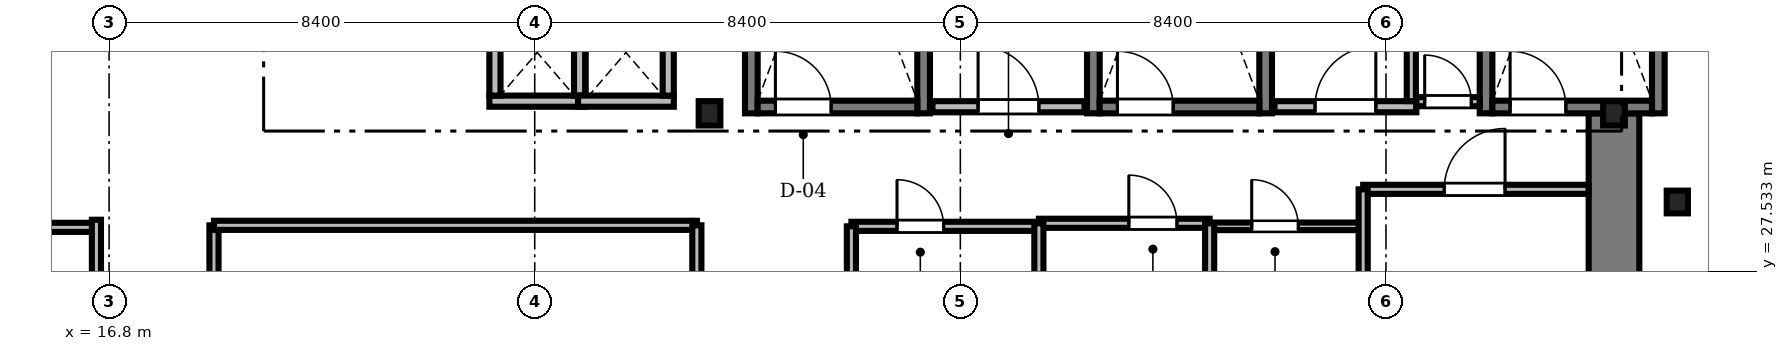
"""IFC4 building model, lengths in metres.
Left out: names, types, materials, properties, quantities, classifications, styles, units other than length and angle.
Written with IfcOpenShell. Run it as: python <this file> out.ifc"""

import sys

from ifc_helpers import new_model, si_unit, direction, frame, frame_2d, origin, origin_2d, place, context, subcontext, project, spatial, rectangle, i_section, extrude, source, transform, mapped, element, fill, save


model = new_model("IFC4")
c1 = context("Model", 3, precision=1e-05, world=origin(), true_north=direction((0.0, 1.0)))
c2 = subcontext(c1, "Body", "Model", "MODEL_VIEW")
j1 = project(units=[si_unit("LENGTHUNIT", "METRE"), si_unit("PLANEANGLEUNIT", "RADIAN")], contexts=[c1])
p1 = place(None, origin())
s1 = spatial("IfcSite", under=j1, at=p1, CompositionType="ELEMENT")
p2 = place(p1, origin())
s2 = spatial("IfcBuilding", under=s1, at=p2, CompositionType="ELEMENT")
p3 = place(p2, frame((0.0, 0.0, 78.7)))
s3 = spatial("IfcBuildingStorey", under=s2, at=p3, CompositionType="ELEMENT", Elevation=78.7)
m1 = source(origin(), c2, "Body", "SweptSolid", [
    extrude(rectangle(XDim=13.15, YDim=1.0, at=frame_2d((6.575, 0.0))), origin(), (0.0, 0.0, 1.0), 3.41),
])
p4 = place(p3, frame((46.5, 17.5, 0.0), z_axis=(0.0, 0.0, 1.0), x_axis=(0.0, 1.0, 0.0)))
e1 = element("IfcWall", 1, at=p4, inside=s3, PredefinedType="SHEAR", context=c2, shape_type="MappedRepresentation", body=[
    mapped(m1, transform((0.0, 0.0, 0.0), scale=1.0)),
])
m2 = source(origin(), c2, "Body", "SweptSolid", [
    extrude(i_section(OverallWidth=0.428, OverallDepth=0.481, WebThickness=0.04, FlangeThickness=0.063, FilletRadius=0.015, at=origin_2d()), origin(), (0.0, 0.0, 1.0), 3.41),
])
for number, where, z_axis, x_axis in (
    (2, (28.65, 30.65, 0.0), (0.0, 0.0, 1.0), (1.0, 0.0, 0.0)),
    (3, (46.5, 30.65, 0.0), (0.0, 0.0, 1.0), (1.0, 0.0, 0.0)),
):
    element("IfcColumn", number, at=place(p3, frame(where, z_axis=z_axis, x_axis=x_axis)), inside=s3, PredefinedType="COLUMN", context=c2, shape_type="MappedRepresentation", body=[
        mapped(m2, transform((0.0, 0.0, 0.0), scale=1.0)),
    ])
m3 = source(origin(), c2, "Body", "SweptSolid", [
    extrude(i_section(OverallWidth=0.419, OverallDepth=0.449, WebThickness=0.031, FlangeThickness=0.048, FilletRadius=0.015, at=origin_2d()), origin(), (0.0, 0.0, 1.0), 3.41),
])
p5 = place(p3, frame((47.75, 28.9, 0.0), z_axis=(0.0, 0.0, 1.0), x_axis=(1.0, 0.0, 0.0)))
e4 = element("IfcColumn", 4, at=p5, inside=s3, PredefinedType="COLUMN", context=c2, shape_type="MappedRepresentation", body=[
    mapped(m3, transform((0.0, 0.0, 0.0), scale=1.0)),
])
m4 = source(origin(), c2, "Body", "SweptSolid", [
    extrude(rectangle(XDim=9.15, YDim=0.25, at=frame_2d((4.575, 0.0))), origin(), (0.0, 0.0, 1.0), 3.45),
])
for number, where, z_axis, x_axis in (
    (5, (29.475, 30.65, 0.0), (0.0, 0.0, 1.0), (0.0, 1.0, 0.0)),
    (6, (32.875, 30.65, 0.0), (0.0, 0.0, 1.0), (0.0, 1.0, 0.0)),
):
    element("IfcWall", number, at=place(p3, frame(where, z_axis=z_axis, x_axis=x_axis)), inside=s3, PredefinedType="SOLIDWALL", context=c2, shape_type="MappedRepresentation", body=[
        mapped(m4, transform((0.0, 0.0, 0.0), scale=1.0)),
    ])
m5 = source(origin(), c2, "Body", "SweptSolid", [
    extrude(rectangle(XDim=3.15, YDim=0.25, at=frame_2d((1.575, 0.0))), origin(), (0.0, 0.0, 1.0), 3.45),
])
p6 = place(p3, frame((29.6, 30.775, 0.0), z_axis=(0.0, 0.0, 1.0), x_axis=(1.0, 0.0, 0.0)))
e7 = element("IfcWall", 7, at=p6, inside=s3, PredefinedType="SOLIDWALL", context=c2, shape_type="MappedRepresentation", body=[
    mapped(m5, transform((0.0, 0.0, 0.0), scale=1.0)),
])
m6 = source(origin(), c2, "Body", "SweptSolid", [
    extrude(rectangle(XDim=1.1, YDim=2.2, at=frame_2d((0.55, 1.1))), frame((0.0, 0.135, 0.0), z_axis=(0.0, -1.0, 0.0), x_axis=(1.0, 0.0, 0.0)), (0.0, 0.0, 1.0), 0.27),
])
p7 = place(p6, frame((0.35, 0.0, 0.0)))
e8 = element("IfcOpeningElement", 8, at=p7, cuts=e7, PredefinedType="OPENING", context=c2, shape_type="MappedRepresentation", body=[
    mapped(m6, transform((0.0, 0.0, 0.0), scale=1.0)),
])
for number, where, z_axis, x_axis in (
    (9, (36.225, 30.65, 0.0), (0.0, 0.0, 1.0), (0.0, 1.0, 0.0)),
    (10, (39.625, 30.65, 0.0), (0.0, 0.0, 1.0), (0.0, 1.0, 0.0)),
):
    element("IfcWall", number, at=place(p3, frame(where, z_axis=z_axis, x_axis=x_axis)), inside=s3, PredefinedType="SOLIDWALL", context=c2, shape_type="MappedRepresentation", body=[
        mapped(m4, transform((0.0, 0.0, 0.0), scale=1.0)),
    ])
p8 = place(p3, frame((36.35, 30.775, 0.0), z_axis=(0.0, 0.0, 1.0), x_axis=(1.0, 0.0, 0.0)))
e11 = element("IfcWall", 11, at=p8, inside=s3, PredefinedType="SOLIDWALL", context=c2, shape_type="MappedRepresentation", body=[
    mapped(m5, transform((0.0, 0.0, 0.0), scale=1.0)),
])
p9 = place(p8, frame((0.35, 0.0, 0.0)))
e12 = element("IfcOpeningElement", 12, at=p9, cuts=e11, PredefinedType="OPENING", context=c2, shape_type="MappedRepresentation", body=[
    mapped(m6, transform((0.0, 0.0, 0.0), scale=1.0)),
])
for number, where, z_axis, x_axis in (
    (13, (43.975, 30.65, 0.0), (0.0, 0.0, 1.0), (0.0, 1.0, 0.0)),
    (14, (47.375, 30.65, 0.0), (0.0, 0.0, 1.0), (0.0, 1.0, 0.0)),
):
    element("IfcWall", number, at=place(p3, frame(where, z_axis=z_axis, x_axis=x_axis)), inside=s3, PredefinedType="SOLIDWALL", context=c2, shape_type="MappedRepresentation", body=[
        mapped(m4, transform((0.0, 0.0, 0.0), scale=1.0)),
    ])
p10 = place(p3, frame((44.1, 30.775, 0.0), z_axis=(0.0, 0.0, 1.0), x_axis=(1.0, 0.0, 0.0)))
e15 = element("IfcWall", 15, at=p10, inside=s3, PredefinedType="SOLIDWALL", context=c2, shape_type="MappedRepresentation", body=[
    mapped(m5, transform((0.0, 0.0, 0.0), scale=1.0)),
])
p11 = place(p10, frame((0.35, 0.0, 0.0)))
e16 = element("IfcOpeningElement", 16, at=p11, cuts=e15, PredefinedType="OPENING", context=c2, shape_type="MappedRepresentation", body=[
    mapped(m6, transform((0.0, 0.0, 0.0), scale=1.0)),
])
m7 = source(origin(), c2, "Body", "SweptSolid", [
    extrude(rectangle(XDim=3.0, YDim=0.22, at=frame_2d((1.5, 0.0))), origin(), (0.0, 0.0, 1.0), 3.41),
])
p12 = place(p3, frame((33.05, 30.78, 0.0), z_axis=(0.0, 0.0, 1.0), x_axis=(1.0, 0.0, 0.0)))
e17 = element("IfcWall", 17, at=p12, inside=s3, PredefinedType="SOLIDWALL", context=c2, shape_type="MappedRepresentation", body=[
    mapped(m7, transform((0.0, 0.0, 0.0), scale=1.0)),
])
m8 = source(origin(), c2, "Body", "SweptSolid", [
    extrude(rectangle(XDim=1.2, YDim=2.2, at=frame_2d((0.6, 1.1))), frame((0.0, 0.12, 0.0), z_axis=(0.0, -1.0, 0.0), x_axis=(1.0, 0.0, 0.0)), (0.0, 0.0, 1.0), 0.24),
])
p13 = place(p12, frame((0.9, 0.0, 0.0)))
e18 = element("IfcOpeningElement", 18, at=p13, cuts=e17, PredefinedType="OPENING", context=c2, shape_type="MappedRepresentation", body=[
    mapped(m8, transform((0.0, 0.0, 0.0), scale=1.0)),
])
m9 = source(origin(), c2, "Body", "SweptSolid", [
    extrude(rectangle(XDim=2.8, YDim=0.22, at=frame_2d((1.4, 0.0))), origin(), (0.0, 0.0, 1.0), 3.41),
])
p14 = place(p3, frame((39.8, 30.78, 0.0), z_axis=(0.0, 0.0, 1.0), x_axis=(1.0, 0.0, 0.0)))
e19 = element("IfcWall", 19, at=p14, inside=s3, PredefinedType="SOLIDWALL", context=c2, shape_type="MappedRepresentation", body=[
    mapped(m9, transform((0.0, 0.0, 0.0), scale=1.0)),
])
p15 = place(p14, frame((0.8, 0.0, 0.0)))
e20 = element("IfcOpeningElement", 20, at=p15, cuts=e19, PredefinedType="OPENING", context=c2, shape_type="MappedRepresentation", body=[
    mapped(m8, transform((0.0, 0.0, 0.0), scale=1.0)),
])
m10 = source(origin(), c2, "Body", "SweptSolid", [
    extrude(rectangle(XDim=1.89, YDim=0.22, at=frame_2d((0.945, 0.0))), origin(), (0.0, 0.0, 1.0), 3.41),
])
p16 = place(p3, frame((24.305, 30.89, 0.0), z_axis=(0.0, 0.0, 1.0), x_axis=(1.0, 0.0, 0.0)))
e21 = element("IfcWall", 21, at=p16, inside=s3, PredefinedType="SOLIDWALL", context=c2, shape_type="MappedRepresentation", body=[
    mapped(m10, transform((0.0, 0.0, 0.0), scale=1.0)),
])
m11 = source(origin(), c2, "Body", "SweptSolid", [
    extrude(rectangle(XDim=1.7, YDim=0.22, at=frame_2d((0.85, 0.0))), origin(), (0.0, 0.0, 1.0), 3.41),
])
for number, where, z_axis, x_axis in (
    (22, (24.415, 31.0, 0.0), (0.0, 0.0, 1.0), (0.0, 1.0, 0.0)),
    (23, (26.085, 31.0, 0.0), (0.0, 0.0, 1.0), (0.0, 1.0, 0.0)),
):
    element("IfcWall", number, at=place(p3, frame(where, z_axis=z_axis, x_axis=x_axis)), inside=s3, PredefinedType="SOLIDWALL", context=c2, shape_type="MappedRepresentation", body=[
        mapped(m11, transform((0.0, 0.0, 0.0), scale=1.0)),
    ])
p17 = place(p3, frame((26.055, 30.89, 0.0), z_axis=(0.0, 0.0, 1.0), x_axis=(1.0, 0.0, 0.0)))
e24 = element("IfcWall", 24, at=p17, inside=s3, PredefinedType="SOLIDWALL", context=c2, shape_type="MappedRepresentation", body=[
    mapped(m10, transform((0.0, 0.0, 0.0), scale=1.0)),
])
p18 = place(p3, frame((27.835, 31.0, 0.0), z_axis=(0.0, 0.0, 1.0), x_axis=(0.0, 1.0, 0.0)))
e25 = element("IfcWall", 25, at=p18, inside=s3, PredefinedType="SOLIDWALL", context=c2, shape_type="MappedRepresentation", body=[
    mapped(m11, transform((0.0, 0.0, 0.0), scale=1.0)),
])
m12 = source(origin(), c2, "Body", "SweptSolid", [
    extrude(rectangle(XDim=4.448, YDim=0.18, at=frame_2d((2.224, 0.0))), origin(), (0.0, 0.0, 1.0), 3.042),
])
p19 = place(p3, frame((41.55, 29.15, 0.0), z_axis=(0.0, 0.0, 1.0), x_axis=(1.0, 0.0, 0.0)))
e26 = element("IfcWall", 26, at=p19, inside=s3, PredefinedType="PARTITIONING", context=c2, shape_type="MappedRepresentation", body=[
    mapped(m12, transform((0.0, 0.0, 0.0), scale=1.0)),
])
m13 = source(origin(), c2, "Body", "SweptSolid", [
    extrude(rectangle(XDim=1.2, YDim=2.2, at=frame_2d((0.6, 1.1))), frame((0.0, 0.1, 0.0), z_axis=(0.0, -1.0, 0.0), x_axis=(1.0, 0.0, 0.0)), (0.0, 0.0, 1.0), 0.2),
])
p20 = place(p19, frame((1.6, 0.0, 0.0)))
e27 = element("IfcOpeningElement", 27, at=p20, cuts=e26, PredefinedType="OPENING", context=c2, shape_type="MappedRepresentation", body=[
    mapped(m13, transform((0.0, 0.0, 0.0), scale=1.0)),
])
m14 = source(origin(), c2, "Body", "SweptSolid", [
    extrude(rectangle(XDim=4.24, YDim=0.18, at=frame_2d((2.12, 0.0))), origin(), (0.0, 0.0, 1.0), 2.802),
])
p21 = place(p3, frame((18.87, 24.2, 0.0), z_axis=(0.0, 0.0, 1.0), x_axis=(0.0, 1.0, 0.0)))
e28 = element("IfcWall", 28, at=p21, inside=s3, PredefinedType="PARTITIONING", context=c2, shape_type="MappedRepresentation", body=[
    mapped(m14, transform((0.0, 0.0, 0.0), scale=1.0)),
])
m15 = source(origin(), c2, "Body", "SweptSolid", [
    extrude(rectangle(XDim=1.05, YDim=2.2, at=frame_2d((0.525, 1.1))), frame((0.0, 0.1, 0.0), z_axis=(0.0, -1.0, 0.0), x_axis=(1.0, 0.0, 0.0)), (0.0, 0.0, 1.0), 0.2),
])
p22 = place(p21, frame((1.4, 0.0, 0.0)))
e29 = element("IfcOpeningElement", 29, at=p22, cuts=e28, PredefinedType="OPENING", context=c2, shape_type="MappedRepresentation", body=[
    mapped(m15, transform((0.0, 0.0, 0.0), scale=1.0)),
])
m16 = source(origin(), c2, "Body", "SweptSolid", [
    extrude(rectangle(XDim=3.7, YDim=0.18, at=frame_2d((1.85, 0.0))), origin(), (0.0, 0.0, 1.0), 3.042),
])
p23 = place(p3, frame((31.45, 28.42, 0.0), z_axis=(0.0, 0.0, 1.0), x_axis=(1.0, 0.0, 0.0)))
e30 = element("IfcWall", 30, at=p23, inside=s3, PredefinedType="PARTITIONING", context=c2, shape_type="MappedRepresentation", body=[
    mapped(m16, transform((0.0, 0.0, 0.0), scale=1.0)),
])
m17 = source(origin(), c2, "Body", "SweptSolid", [
    extrude(rectangle(XDim=0.92, YDim=2.1, at=frame_2d((0.46, 1.05))), frame((0.0, 0.1, 0.0), z_axis=(0.0, -1.0, 0.0), x_axis=(1.0, 0.0, 0.0)), (0.0, 0.0, 1.0), 0.2),
])
p24 = place(p23, frame((0.9, 0.0, 0.0)))
e31 = element("IfcOpeningElement", 31, at=p24, cuts=e30, PredefinedType="OPENING", context=c2, shape_type="MappedRepresentation", body=[
    mapped(m17, transform((0.0, 0.0, 0.0), scale=1.0)),
])
m18 = source(origin(), c2, "Body", "SweptSolid", [
    extrude(rectangle(XDim=3.37, YDim=0.18, at=frame_2d((1.685, 0.0))), origin(), (0.0, 0.0, 1.0), 3.41),
])
p25 = place(p3, frame((35.15, 28.48, 0.0), z_axis=(0.0, 0.0, 1.0), x_axis=(1.0, 0.0, 0.0)))
e32 = element("IfcWall", 32, at=p25, inside=s3, PredefinedType="PARTITIONING", context=c2, shape_type="MappedRepresentation", body=[
    mapped(m18, transform((0.0, 0.0, 0.0), scale=1.0)),
])
m19 = source(origin(), c2, "Body", "SweptSolid", [
    extrude(rectangle(XDim=0.95, YDim=2.15, at=frame_2d((0.475, 1.075))), frame((0.0, 0.1, 0.0), z_axis=(0.0, -1.0, 0.0), x_axis=(1.0, 0.0, 0.0)), (0.0, 0.0, 1.0), 0.2),
])
p26 = place(p25, frame((1.775, 0.0, 0.0)))
e33 = element("IfcOpeningElement", 33, at=p26, cuts=e32, PredefinedType="OPENING", context=c2, shape_type="MappedRepresentation", body=[
    mapped(m19, transform((0.0, 0.0, 0.0), scale=1.0)),
])
m20 = source(origin(), c2, "Body", "SweptSolid", [
    extrude(rectangle(XDim=3.0, YDim=0.15, at=frame_2d((1.5, 0.0))), origin(), (0.0, 0.0, 1.0), 3.41),
])
p27 = place(p3, frame((38.52, 28.42, 0.0), z_axis=(0.0, 0.0, 1.0), x_axis=(1.0, 0.0, 0.0)))
e34 = element("IfcWall", 34, at=p27, inside=s3, PredefinedType="PARTITIONING", context=c2, shape_type="MappedRepresentation", body=[
    mapped(m20, transform((0.0, 0.0, 0.0), scale=1.0)),
])
m21 = source(origin(), c2, "Body", "SweptSolid", [
    extrude(rectangle(XDim=0.92, YDim=2.1, at=frame_2d((0.46, 1.05))), frame((0.0, 0.085, 0.0), z_axis=(0.0, -1.0, 0.0), x_axis=(1.0, 0.0, 0.0)), (0.0, 0.0, 1.0), 0.17),
])
p28 = place(p27, frame((0.83, 0.0, 0.0)))
e35 = element("IfcOpeningElement", 35, at=p28, cuts=e34, PredefinedType="OPENING", context=c2, shape_type="MappedRepresentation", body=[
    mapped(m21, transform((0.0, 0.0, 0.0), scale=1.0)),
])
m22 = source(origin(), c2, "Body", "SweptSolid", [
    extrude(rectangle(XDim=1.248, YDim=0.18, at=frame_2d((0.624, 0.0))), origin(), (0.0, 0.0, 1.0), 3.41),
])
p29 = place(p3, frame((42.6, 30.88, 0.0), z_axis=(0.0, 0.0, 1.0), x_axis=(1.0, 0.0, 0.0)))
e36 = element("IfcWall", 36, at=p29, inside=s3, PredefinedType="PARTITIONING", context=c2, shape_type="MappedRepresentation", body=[
    mapped(m22, transform((0.0, 0.0, 0.0), scale=1.0)),
])
p30 = place(p29, frame((0.164, 0.0, 0.0)))
e37 = element("IfcOpeningElement", 37, at=p30, cuts=e36, PredefinedType="OPENING", context=c2, shape_type="MappedRepresentation", body=[
    mapped(m17, transform((0.0, 0.0, 0.0), scale=1.0)),
])
m23 = source(origin(), c2, "Body", "SweptSolid", [
    extrude(rectangle(XDim=14.32, YDim=0.18, at=frame_2d((7.16, 0.0))), origin(), (0.0, 0.0, 1.0), 2.652),
])
p31 = place(p3, frame((2.23, 28.4, 0.0), z_axis=(0.0, 0.0, 1.0), x_axis=(1.0, 0.0, 0.0)))
e38 = element("IfcWall", 38, at=p31, inside=s3, PredefinedType="PARTITIONING", context=c2, shape_type="MappedRepresentation", body=[
    mapped(m23, transform((0.0, 0.0, 0.0), scale=1.0)),
])
m24 = source(origin(), c2, "Body", "SweptSolid", [
    extrude(rectangle(XDim=13.79, YDim=0.18, at=frame_2d((6.895, 0.0))), origin(), (0.0, 0.0, 1.0), 2.802),
])
p32 = place(p3, frame((16.55, 14.76, 0.0), z_axis=(0.0, 0.0, 1.0), x_axis=(0.0, 1.0, 0.0)))
e39 = element("IfcWall", 39, at=p32, inside=s3, PredefinedType="PARTITIONING", context=c2, shape_type="MappedRepresentation", body=[
    mapped(m24, transform((0.0, 0.0, 0.0), scale=1.0)),
])
m25 = source(origin(), c2, "Body", "SweptSolid", [
    extrude(rectangle(XDim=9.53, YDim=0.18, at=frame_2d((4.765, 0.0))), origin(), (0.0, 0.0, 1.0), 3.41),
])
p33 = place(p3, frame((18.87, 28.44, 0.0), z_axis=(0.0, 0.0, 1.0), x_axis=(1.0, 0.0, 0.0)))
e40 = element("IfcWall", 40, at=p33, inside=s3, PredefinedType="PARTITIONING", context=c2, shape_type="MappedRepresentation", body=[
    mapped(m25, transform((0.0, 0.0, 0.0), scale=1.0)),
])
p34 = place(p3, frame((28.4, 24.2, 0.0), z_axis=(0.0, 0.0, 1.0), x_axis=(0.0, 1.0, 0.0)))
e41 = element("IfcWall", 41, at=p34, inside=s3, PredefinedType="PARTITIONING", context=c2, shape_type="MappedRepresentation", body=[
    mapped(m14, transform((0.0, 0.0, 0.0), scale=1.0)),
])
m26 = source(origin(), c2, "Body", "SweptSolid", [
    extrude(rectangle(XDim=2.35, YDim=0.18, at=frame_2d((1.175, 0.0))), origin(), (0.0, 0.0, 1.0), 2.802),
])
p35 = place(p3, frame((41.55, 26.8, 0.0), z_axis=(0.0, 0.0, 1.0), x_axis=(0.0, 1.0, 0.0)))
e42 = element("IfcWall", 42, at=p35, inside=s3, PredefinedType="PARTITIONING", context=c2, shape_type="MappedRepresentation", body=[
    mapped(m26, transform((0.0, 0.0, 0.0), scale=1.0)),
])
m27 = source(origin(), c2, "Body", "SweptSolid", [
    extrude(rectangle(XDim=1.858, YDim=0.18, at=frame_2d((0.929, 0.0))), origin(), (0.0, 0.0, 1.0), 3.41),
])
p36 = place(p3, frame((42.5, 30.892, 0.0), z_axis=(0.0, 0.0, 1.0), x_axis=(0.0, 1.0, 0.0)))
e43 = element("IfcWall", 43, at=p36, inside=s3, PredefinedType="PARTITIONING", context=c2, shape_type="MappedRepresentation", body=[
    mapped(m27, transform((0.0, 0.0, 0.0), scale=1.0)),
])
m28 = source(origin(), c2, "Body", "SweptSolid", [
    extrude(rectangle(XDim=1.66, YDim=0.18, at=frame_2d((0.83, 0.0))), origin(), (0.0, 0.0, 1.0), 2.952),
])
for number, where, z_axis, x_axis in (
    (44, (35.15, 26.82, 0.0), (0.0, 0.0, 1.0), (0.0, 1.0, 0.0)),
    (45, (38.52, 26.82, 0.0), (0.0, 0.0, 1.0), (0.0, 1.0, 0.0)),
):
    element("IfcWall", number, at=place(p3, frame(where, z_axis=z_axis, x_axis=x_axis)), inside=s3, PredefinedType="PARTITIONING", context=c2, shape_type="MappedRepresentation", body=[
        mapped(m28, transform((0.0, 0.0, 0.0), scale=1.0)),
    ])
m29 = source(origin(), c2, "Body", "SweptSolid", [
    extrude(rectangle(XDim=1.6, YDim=0.18, at=frame_2d((0.8, 0.0))), origin(), (0.0, 0.0, 1.0), 2.952),
])
p37 = place(p3, frame((31.45, 26.82, 0.0), z_axis=(0.0, 0.0, 1.0), x_axis=(0.0, 1.0, 0.0)))
e46 = element("IfcWall", 46, at=p37, inside=s3, PredefinedType="PARTITIONING", context=c2, shape_type="MappedRepresentation", body=[
    mapped(m29, transform((0.0, 0.0, 0.0), scale=1.0)),
])
m30 = source(origin(), c2, "Body", "SweptSolid", [
    extrude(rectangle(XDim=1.1, YDim=2.2, at=frame_2d((0.55, 1.1))), frame((0.0, 0.025, 0.0), z_axis=(0.0, -1.0, 0.0), x_axis=(1.0, 0.0, 0.0)), (0.0, 0.0, 1.0), 0.05),
])
p38 = place(p7, origin())
e47 = element("IfcDoor", 47, at=p38, inside=s3, OperationType="SINGLE_SWING_LEFT", PredefinedType="DOOR", context=c2, shape_type="MappedRepresentation", body=[
    mapped(m30, transform((0.0, 0.0, 0.0), scale=1.0)),
])
fill(e8, e47)
p39 = place(p9, origin())
e48 = element("IfcDoor", 48, at=p39, inside=s3, OperationType="SINGLE_SWING_LEFT", PredefinedType="DOOR", context=c2, shape_type="MappedRepresentation", body=[
    mapped(m30, transform((0.0, 0.0, 0.0), scale=1.0)),
])
fill(e12, e48)
p40 = place(p11, origin())
e49 = element("IfcDoor", 49, at=p40, inside=s3, OperationType="SINGLE_SWING_LEFT", PredefinedType="DOOR", context=c2, shape_type="MappedRepresentation", body=[
    mapped(m30, transform((0.0, 0.0, 0.0), scale=1.0)),
])
fill(e16, e49)
m31 = source(origin(), c2, "Body", "SweptSolid", [
    extrude(rectangle(XDim=1.2, YDim=2.2, at=frame_2d((0.6, 1.1))), frame((0.0, 0.025, 0.0), z_axis=(0.0, -1.0, 0.0), x_axis=(1.0, 0.0, 0.0)), (0.0, 0.0, 1.0), 0.05),
])
p41 = place(p13, origin())
e50 = element("IfcDoor", 50, at=p41, inside=s3, OperationType="SINGLE_SWING_LEFT", PredefinedType="DOOR", context=c2, shape_type="MappedRepresentation", body=[
    mapped(m31, transform((0.0, 0.0, 0.0), scale=1.0)),
])
fill(e18, e50)
p42 = place(p15, origin())
e51 = element("IfcDoor", 51, at=p42, inside=s3, OperationType="SINGLE_SWING_RIGHT", PredefinedType="DOOR", context=c2, shape_type="MappedRepresentation", body=[
    mapped(m31, transform((0.0, 0.0, 0.0), scale=1.0)),
])
fill(e20, e51)
p43 = place(p20, origin())
e52 = element("IfcDoor", 52, at=p43, inside=s3, OperationType="SINGLE_SWING_RIGHT", PredefinedType="DOOR", context=c2, shape_type="MappedRepresentation", body=[
    mapped(m31, transform((0.0, 0.0, 0.0), scale=1.0)),
])
fill(e27, e52)
m32 = source(origin(), c2, "Body", "SweptSolid", [
    extrude(rectangle(XDim=0.92, YDim=2.1, at=frame_2d((0.46, 1.05))), frame((0.0, 0.025, 0.0), z_axis=(0.0, -1.0, 0.0), x_axis=(1.0, 0.0, 0.0)), (0.0, 0.0, 1.0), 0.05),
])
p44 = place(p24, origin())
e53 = element("IfcDoor", 53, at=p44, inside=s3, OperationType="SINGLE_SWING_LEFT", PredefinedType="DOOR", context=c2, shape_type="MappedRepresentation", body=[
    mapped(m32, transform((0.0, 0.0, 0.0), scale=1.0)),
])
fill(e31, e53)
m33 = source(origin(), c2, "Body", "SweptSolid", [
    extrude(rectangle(XDim=0.95, YDim=2.15, at=frame_2d((0.475, 1.075))), frame((0.0, 0.025, 0.0), z_axis=(0.0, -1.0, 0.0), x_axis=(1.0, 0.0, 0.0)), (0.0, 0.0, 1.0), 0.05),
])
p45 = place(p26, origin())
e54 = element("IfcDoor", 54, at=p45, inside=s3, OperationType="SINGLE_SWING_LEFT", PredefinedType="DOOR", context=c2, shape_type="MappedRepresentation", body=[
    mapped(m33, transform((0.0, 0.0, 0.0), scale=1.0)),
])
fill(e33, e54)
p46 = place(p28, origin())
e55 = element("IfcDoor", 55, at=p46, inside=s3, OperationType="SINGLE_SWING_LEFT", PredefinedType="DOOR", context=c2, shape_type="MappedRepresentation", body=[
    mapped(m32, transform((0.0, 0.0, 0.0), scale=1.0)),
])
fill(e35, e55)
p47 = place(p30, origin())
e56 = element("IfcDoor", 56, at=p47, inside=s3, OperationType="SINGLE_SWING_LEFT", PredefinedType="DOOR", context=c2, shape_type="MappedRepresentation", body=[
    mapped(m32, transform((0.0, 0.0, 0.0), scale=1.0)),
])
fill(e37, e56)
save(model, sys.argv[1])
